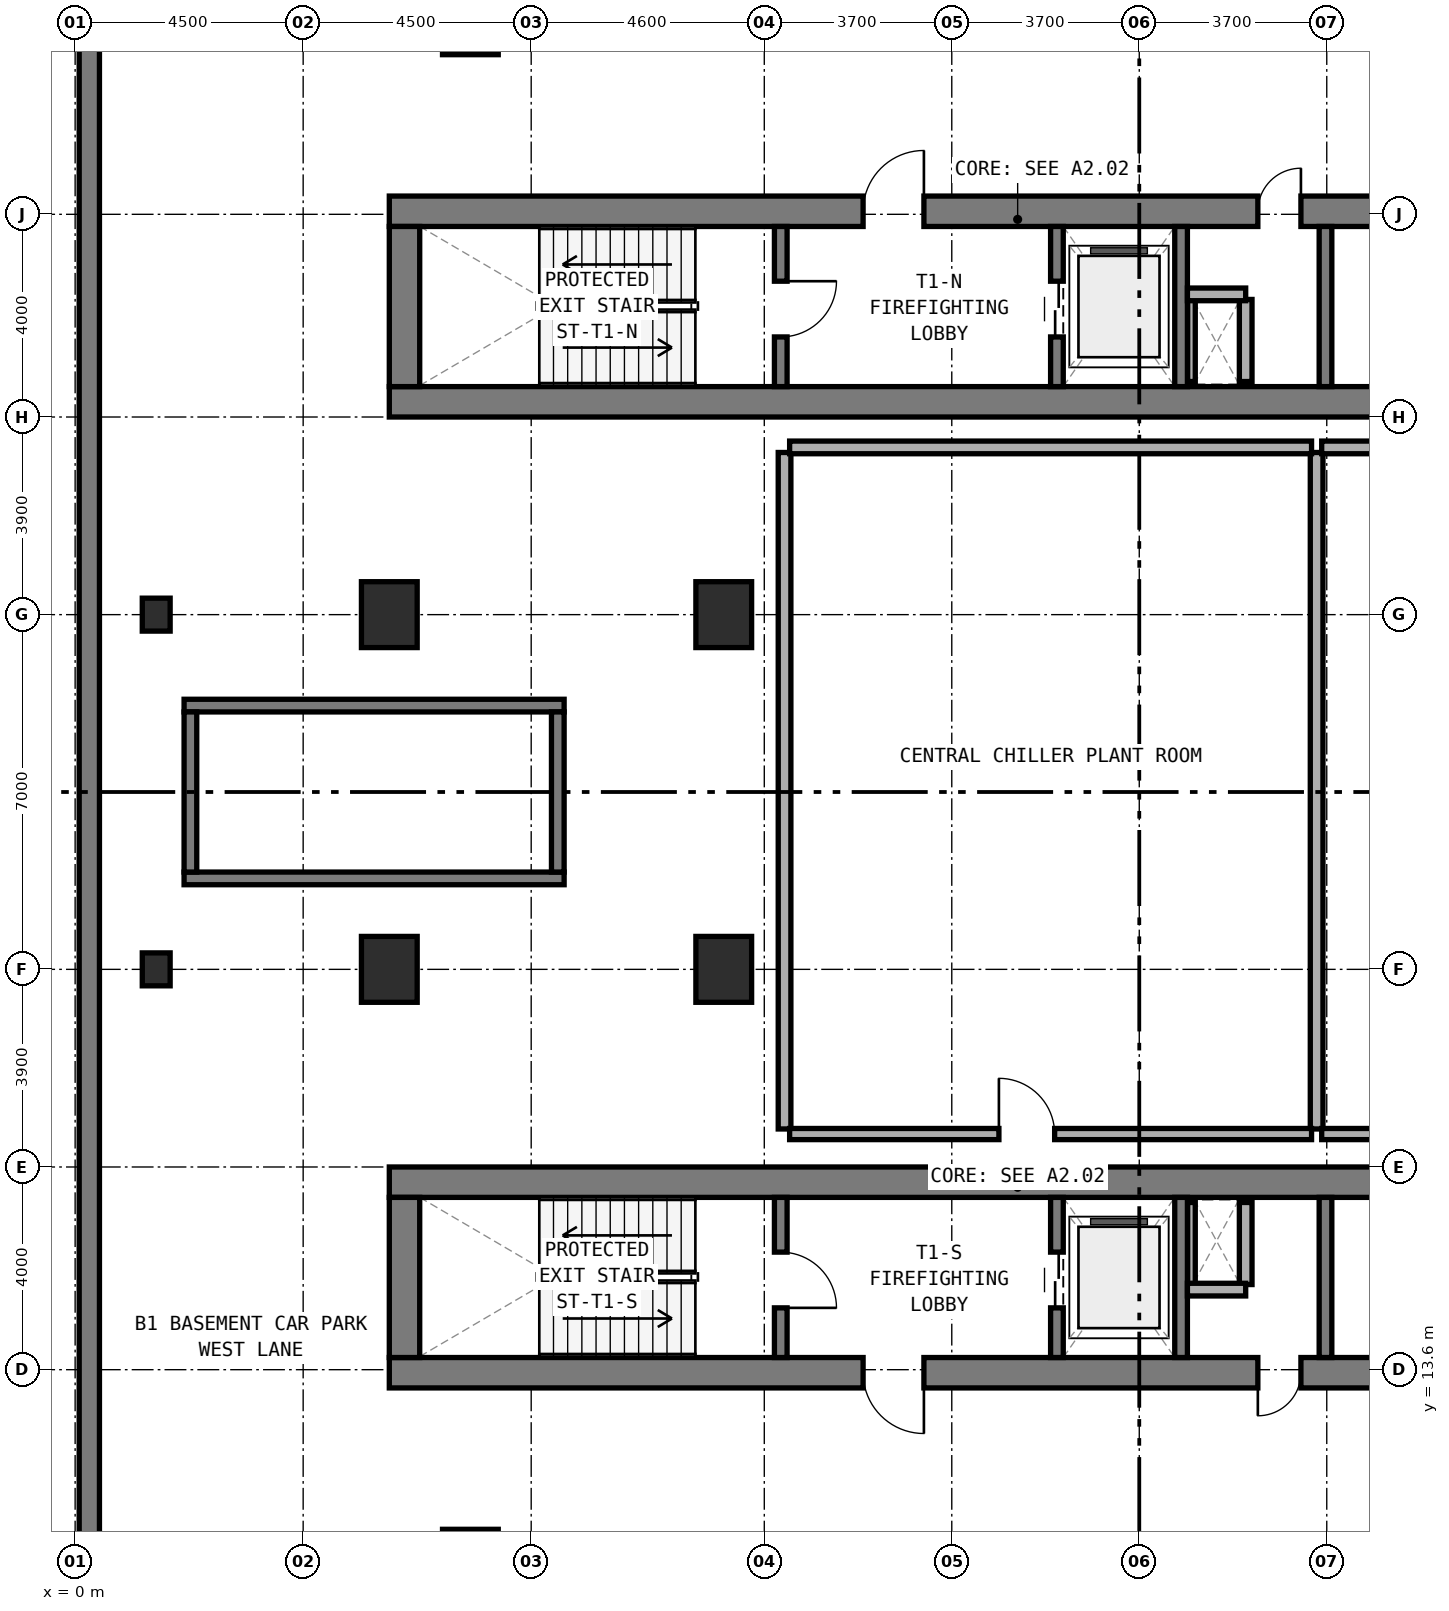
"""IFC4 building model, lengths in metres.
Left out: names, types, materials, properties, quantities, classifications, styles, units other than length and angle.
Written with IfcOpenShell. Run it as: python <this file> out.ifc"""

import sys

from ifc_helpers import new_model, si_unit, direction, frame, frame_2d, origin, origin_2d, place, context, subcontext, project, spatial, rectangle, extrude, element, fill, save


model = new_model("IFC4")
c1 = context("Model", 3, precision=1e-05, world=origin(), true_north=direction((0.0, 1.0)))
c2 = subcontext(c1, "Body", "Model", "MODEL_VIEW")
j1 = project(units=[si_unit("LENGTHUNIT", "METRE"), si_unit("PLANEANGLEUNIT", "RADIAN")], contexts=[c1])
p1 = place(None, origin())
s1 = spatial("IfcSite", under=j1, at=p1, CompositionType="ELEMENT")
p2 = place(p1, origin())
s2 = spatial("IfcBuilding", under=s1, at=p2, CompositionType="ELEMENT")
p3 = place(p2, frame((0.0, 0.0, -4.2)))
s3 = spatial("IfcBuildingStorey", under=s2, at=p3, CompositionType="ELEMENT", Elevation=-4.2)
p4 = place(p3, frame((0.28, 49.52, 0.0), z_axis=(0.0, 0.0, 1.0), x_axis=(0.0, -1.0, 0.0)))
e1 = element("IfcWall", 1, at=p4, inside=s3, PredefinedType="USERDEFINED", context=c2, shape_type="SweptSolid", body=[
    extrude(rectangle(XDim=49.04, YDim=0.4, at=frame_2d((24.52, 0.0))), origin(), (0.0, 0.0, 1.0), 4.2),
])
p5 = place(p3, frame((6.2, 32.7, 0.0), z_axis=(0.0, 0.0, 1.0), x_axis=(1.0, 0.0, 0.0)))
e2 = element("IfcWall", 2, at=p5, inside=s3, PredefinedType="SHEAR", context=c2, shape_type="SweptSolid", body=[
    extrude(rectangle(XDim=24.8, YDim=0.6, at=frame_2d((12.4, 0.0))), origin(), (0.0, 0.0, 1.0), 4.2),
])
p6 = place(p3, frame((6.2, 36.46, 0.0), z_axis=(0.0, 0.0, 1.0), x_axis=(1.0, 0.0, 0.0)))
e3 = element("IfcWall", 3, at=p6, inside=s3, PredefinedType="SHEAR", context=c2, shape_type="SweptSolid", body=[
    extrude(rectangle(XDim=24.8, YDim=0.6, at=frame_2d((12.4, 0.0))), origin(), (0.0, 0.0, 1.0), 4.2),
])
p7 = place(p6, frame((9.35, 0.0, 0.0)))
e4 = element("IfcOpeningElement", 4, at=p7, cuts=e3, PredefinedType="OPENING", context=c2, shape_type="SweptSolid", body=[
    extrude(rectangle(XDim=1.2, YDim=2.15, at=frame_2d((0.6, 1.075))), frame((0.0, 0.31, 0.0), z_axis=(0.0, -1.0, 0.0), x_axis=(1.0, 0.0, 0.0)), (0.0, 0.0, 1.0), 0.62),
])
p8 = place(p6, frame((17.14, 0.0, 0.0)))
e5 = element("IfcOpeningElement", 5, at=p8, cuts=e3, PredefinedType="OPENING", context=c2, shape_type="SweptSolid", body=[
    extrude(rectangle(XDim=0.85, YDim=2.1, at=frame_2d((0.425, 1.05))), frame((0.0, 0.31, 0.0), z_axis=(0.0, -1.0, 0.0), x_axis=(1.0, 0.0, 0.0)), (0.0, 0.0, 1.0), 0.62),
])
p9 = place(p3, frame((6.5, 33.0, 0.0), z_axis=(0.0, 0.0, 1.0), x_axis=(0.0, 1.0, 0.0)))
e6 = element("IfcWall", 6, at=p9, inside=s3, PredefinedType="SHEAR", context=c2, shape_type="SweptSolid", body=[
    extrude(rectangle(XDim=3.16, YDim=0.6, at=frame_2d((1.58, 0.0))), origin(), (0.0, 0.0, 1.0), 4.2),
])
p10 = place(p3, frame((13.925, 33.0, 0.0), z_axis=(0.0, 0.0, 1.0), x_axis=(0.0, 1.0, 0.0)))
e7 = element("IfcWall", 7, at=p10, inside=s3, PredefinedType="STANDARD", context=c2, shape_type="SweptSolid", body=[
    extrude(rectangle(XDim=3.16, YDim=0.25, at=frame_2d((1.58, 0.0))), origin(), (0.0, 0.0, 1.0), 3.85),
])
p11 = place(p10, frame((0.98, 0.0, 0.0)))
e8 = element("IfcOpeningElement", 8, at=p11, cuts=e7, PredefinedType="OPENING", context=c2, shape_type="SweptSolid", body=[
    extrude(rectangle(XDim=1.1, YDim=2.15, at=frame_2d((0.55, 1.075))), frame((0.0, 0.135, 0.0), z_axis=(0.0, -1.0, 0.0), x_axis=(1.0, 0.0, 0.0)), (0.0, 0.0, 1.0), 0.27),
])
p12 = place(p3, frame((19.375, 33.0, 0.0), z_axis=(0.0, 0.0, 1.0), x_axis=(0.0, 1.0, 0.0)))
e9 = element("IfcWall", 9, at=p12, inside=s3, PredefinedType="STANDARD", context=c2, shape_type="SweptSolid", body=[
    extrude(rectangle(XDim=3.16, YDim=0.25, at=frame_2d((1.58, 0.0))), origin(), (0.0, 0.0, 1.0), 3.85),
])
p13 = place(p12, frame((0.98, 0.0, 0.0)))
e10 = element("IfcOpeningElement", 10, at=p13, cuts=e9, PredefinedType="OPENING", context=c2, shape_type="SweptSolid", body=[
    extrude(rectangle(XDim=1.1, YDim=2.15, at=frame_2d((0.55, 1.075))), frame((0.0, 0.135, 0.0), z_axis=(0.0, -1.0, 0.0), x_axis=(1.0, 0.0, 0.0)), (0.0, 0.0, 1.0), 0.27),
])
for number, where, z_axis, x_axis in (
    (11, (21.825, 33.0, 0.0), (0.0, 0.0, 1.0), (0.0, 1.0, 0.0)),
    (12, (24.675, 33.0, 0.0), (0.0, 0.0, 1.0), (0.0, 1.0, 0.0)),
):
    element("IfcWall", number, at=place(p3, frame(where, z_axis=z_axis, x_axis=x_axis)), inside=s3, PredefinedType="STANDARD", context=c2, shape_type="SweptSolid", body=[
        extrude(rectangle(XDim=3.16, YDim=0.25, at=frame_2d((1.58, 0.0))), origin(), (0.0, 0.0, 1.0), 3.85),
    ])
p14 = place(p3, frame((6.2, 13.54, 0.0), z_axis=(0.0, 0.0, 1.0), x_axis=(1.0, 0.0, 0.0)))
e13 = element("IfcWall", 13, at=p14, inside=s3, PredefinedType="SHEAR", context=c2, shape_type="SweptSolid", body=[
    extrude(rectangle(XDim=24.8, YDim=0.6, at=frame_2d((12.4, 0.0))), origin(), (0.0, 0.0, 1.0), 4.2),
])
p15 = place(p14, frame((9.35, 0.0, 0.0)))
e14 = element("IfcOpeningElement", 14, at=p15, cuts=e13, PredefinedType="OPENING", context=c2, shape_type="SweptSolid", body=[
    extrude(rectangle(XDim=1.2, YDim=2.15, at=frame_2d((0.6, 1.075))), frame((0.0, 0.31, 0.0), z_axis=(0.0, -1.0, 0.0), x_axis=(1.0, 0.0, 0.0)), (0.0, 0.0, 1.0), 0.62),
])
p16 = place(p14, frame((17.14, 0.0, 0.0)))
e15 = element("IfcOpeningElement", 15, at=p16, cuts=e13, PredefinedType="OPENING", context=c2, shape_type="SweptSolid", body=[
    extrude(rectangle(XDim=0.85, YDim=2.1, at=frame_2d((0.425, 1.05))), frame((0.0, 0.31, 0.0), z_axis=(0.0, -1.0, 0.0), x_axis=(1.0, 0.0, 0.0)), (0.0, 0.0, 1.0), 0.62),
])
p17 = place(p3, frame((6.2, 17.3, 0.0), z_axis=(0.0, 0.0, 1.0), x_axis=(1.0, 0.0, 0.0)))
e16 = element("IfcWall", 16, at=p17, inside=s3, PredefinedType="SHEAR", context=c2, shape_type="SweptSolid", body=[
    extrude(rectangle(XDim=24.8, YDim=0.6, at=frame_2d((12.4, 0.0))), origin(), (0.0, 0.0, 1.0), 4.2),
])
p18 = place(p3, frame((6.5, 13.84, 0.0), z_axis=(0.0, 0.0, 1.0), x_axis=(0.0, 1.0, 0.0)))
e17 = element("IfcWall", 17, at=p18, inside=s3, PredefinedType="SHEAR", context=c2, shape_type="SweptSolid", body=[
    extrude(rectangle(XDim=3.16, YDim=0.6, at=frame_2d((1.58, 0.0))), origin(), (0.0, 0.0, 1.0), 4.2),
])
p19 = place(p3, frame((13.925, 13.84, 0.0), z_axis=(0.0, 0.0, 1.0), x_axis=(0.0, 1.0, 0.0)))
e18 = element("IfcWall", 18, at=p19, inside=s3, PredefinedType="STANDARD", context=c2, shape_type="SweptSolid", body=[
    extrude(rectangle(XDim=3.16, YDim=0.25, at=frame_2d((1.58, 0.0))), origin(), (0.0, 0.0, 1.0), 3.85),
])
p20 = place(p19, frame((0.98, 0.0, 0.0)))
e19 = element("IfcOpeningElement", 19, at=p20, cuts=e18, PredefinedType="OPENING", context=c2, shape_type="SweptSolid", body=[
    extrude(rectangle(XDim=1.1, YDim=2.15, at=frame_2d((0.55, 1.075))), frame((0.0, 0.135, 0.0), z_axis=(0.0, -1.0, 0.0), x_axis=(1.0, 0.0, 0.0)), (0.0, 0.0, 1.0), 0.27),
])
p21 = place(p3, frame((19.375, 13.84, 0.0), z_axis=(0.0, 0.0, 1.0), x_axis=(0.0, 1.0, 0.0)))
e20 = element("IfcWall", 20, at=p21, inside=s3, PredefinedType="STANDARD", context=c2, shape_type="SweptSolid", body=[
    extrude(rectangle(XDim=3.16, YDim=0.25, at=frame_2d((1.58, 0.0))), origin(), (0.0, 0.0, 1.0), 3.85),
])
p22 = place(p21, frame((0.98, 0.0, 0.0)))
e21 = element("IfcOpeningElement", 21, at=p22, cuts=e20, PredefinedType="OPENING", context=c2, shape_type="SweptSolid", body=[
    extrude(rectangle(XDim=1.1, YDim=2.15, at=frame_2d((0.55, 1.075))), frame((0.0, 0.135, 0.0), z_axis=(0.0, -1.0, 0.0), x_axis=(1.0, 0.0, 0.0)), (0.0, 0.0, 1.0), 0.27),
])
for number, where, z_axis, x_axis in (
    (22, (21.825, 13.84, 0.0), (0.0, 0.0, 1.0), (0.0, 1.0, 0.0)),
    (23, (24.675, 13.84, 0.0), (0.0, 0.0, 1.0), (0.0, 1.0, 0.0)),
):
    element("IfcWall", number, at=place(p3, frame(where, z_axis=z_axis, x_axis=x_axis)), inside=s3, PredefinedType="STANDARD", context=c2, shape_type="SweptSolid", body=[
        extrude(rectangle(XDim=3.16, YDim=0.25, at=frame_2d((1.58, 0.0))), origin(), (0.0, 0.0, 1.0), 3.85),
    ])
for number, where, z_axis, x_axis in (
    (24, (2.15, 23.295, 0.0), (0.0, 0.0, 1.0), (1.0, 0.0, 0.0)),
    (25, (2.15, 26.705, 0.0), (0.0, 0.0, 1.0), (1.0, 0.0, 0.0)),
):
    element("IfcWall", number, at=place(p3, frame(where, z_axis=z_axis, x_axis=x_axis)), inside=s3, PredefinedType="STANDARD", context=c2, shape_type="SweptSolid", body=[
        extrude(rectangle(XDim=7.5, YDim=0.25, at=frame_2d((3.75, 0.0))), origin(), (0.0, 0.0, 1.0), 4.2),
    ])
for number, where, z_axis, x_axis in (
    (26, (2.275, 23.42, 0.0), (0.0, 0.0, 1.0), (0.0, 1.0, 0.0)),
    (27, (9.525, 23.42, 0.0), (0.0, 0.0, 1.0), (0.0, 1.0, 0.0)),
):
    element("IfcWall", number, at=place(p3, frame(where, z_axis=z_axis, x_axis=x_axis)), inside=s3, PredefinedType="STANDARD", context=c2, shape_type="SweptSolid", body=[
        extrude(rectangle(XDim=3.16, YDim=0.25, at=frame_2d((1.58, 0.0))), origin(), (0.0, 0.0, 1.0), 4.2),
    ])
for number, where, z_axis, x_axis in (
    (28, (6.2, 21.5, 0.0), (0.0, 0.0, 1.0), (1.0, 0.0, 0.0)),
    (29, (6.2, 28.5, 0.0), (0.0, 0.0, 1.0), (1.0, 0.0, 0.0)),
    (30, (7.8, 9.8, 0.0), (0.0, 0.0, 1.0), (1.0, 0.0, 0.0)),
    (31, (7.8, 40.2, 0.0), (0.0, 0.0, 1.0), (1.0, 0.0, 0.0)),
    (32, (12.8, 21.5, 0.0), (0.0, 0.0, 1.0), (1.0, 0.0, 0.0)),
    (33, (12.8, 28.5, 0.0), (0.0, 0.0, 1.0), (1.0, 0.0, 0.0)),
):
    element("IfcColumn", number, at=place(p3, frame(where, z_axis=z_axis, x_axis=x_axis)), inside=s3, PredefinedType="COLUMN", context=c2, shape_type="SweptSolid", body=[
        extrude(rectangle(XDim=1.1, YDim=1.3, at=origin_2d()), origin(), (0.0, 0.0, 1.0), 4.2),
    ])
for number, where, z_axis, x_axis in (
    (34, (1.6, 21.5, 0.0), (0.0, 0.0, 1.0), (1.0, 0.0, 0.0)),
    (35, (1.6, 28.5, 0.0), (0.0, 0.0, 1.0), (1.0, 0.0, 0.0)),
):
    element("IfcColumn", number, at=place(p3, frame(where, z_axis=z_axis, x_axis=x_axis)), inside=s3, PredefinedType="PILASTER", context=c2, shape_type="SweptSolid", body=[
        extrude(rectangle(XDim=0.55, YDim=0.65, at=origin_2d()), origin(), (0.0, 0.0, 1.0), 4.2),
    ])
p23 = place(p3, frame((22.03, 33.1, 0.0), z_axis=(0.0, 0.0, 1.0), x_axis=(0.0, 1.0, 0.0)))
e36 = element("IfcWall", 36, at=p23, inside=s3, PredefinedType="PARTITIONING", context=c2, shape_type="SweptSolid", body=[
    extrude(rectangle(XDim=1.62, YDim=0.15, at=frame_2d((0.81, 0.0))), origin(), (0.0, 0.0, 1.0), 3.85),
])
p24 = place(p3, frame((23.1, 33.1, 0.0), z_axis=(0.0, 0.0, 1.0), x_axis=(0.0, 1.0, 0.0)))
e37 = element("IfcWall", 37, at=p24, inside=s3, PredefinedType="SOLIDWALL", context=c2, shape_type="SweptSolid", body=[
    extrude(rectangle(XDim=1.62, YDim=0.25, at=frame_2d((0.81, 0.0))), origin(), (0.0, 0.0, 1.0), 3.85),
])
p25 = place(p3, frame((21.95, 34.82, 0.0), z_axis=(0.0, 0.0, 1.0), x_axis=(1.0, 0.0, 0.0)))
e38 = element("IfcWall", 38, at=p25, inside=s3, PredefinedType="SOLIDWALL", context=c2, shape_type="SweptSolid", body=[
    extrude(rectangle(XDim=1.15, YDim=0.25, at=frame_2d((0.575, 0.0))), origin(), (0.0, 0.0, 1.0), 3.85),
])
p26 = place(p3, frame((22.03, 15.28, 0.0), z_axis=(0.0, 0.0, 1.0), x_axis=(0.0, 1.0, 0.0)))
e39 = element("IfcWall", 39, at=p26, inside=s3, PredefinedType="PARTITIONING", context=c2, shape_type="SweptSolid", body=[
    extrude(rectangle(XDim=1.62, YDim=0.15, at=frame_2d((0.81, 0.0))), origin(), (0.0, 0.0, 1.0), 3.85),
])
p27 = place(p3, frame((23.1, 15.28, 0.0), z_axis=(0.0, 0.0, 1.0), x_axis=(0.0, 1.0, 0.0)))
e40 = element("IfcWall", 40, at=p27, inside=s3, PredefinedType="SOLIDWALL", context=c2, shape_type="SweptSolid", body=[
    extrude(rectangle(XDim=1.62, YDim=0.25, at=frame_2d((0.81, 0.0))), origin(), (0.0, 0.0, 1.0), 3.85),
])
p28 = place(p3, frame((21.95, 15.18, 0.0), z_axis=(0.0, 0.0, 1.0), x_axis=(1.0, 0.0, 0.0)))
e41 = element("IfcWall", 41, at=p28, inside=s3, PredefinedType="SOLIDWALL", context=c2, shape_type="SweptSolid", body=[
    extrude(rectangle(XDim=1.15, YDim=0.25, at=frame_2d((0.575, 0.0))), origin(), (0.0, 0.0, 1.0), 3.85),
])
for number, where, z_axis, x_axis in (
    (42, (14.0, 18.35, 0.0), (0.0, 0.0, 1.0), (0.0, 1.0, 0.0)),
    (43, (24.5, 18.35, 0.0), (0.0, 0.0, 1.0), (0.0, 1.0, 0.0)),
):
    element("IfcWall", number, at=place(p3, frame(where, z_axis=z_axis, x_axis=x_axis)), inside=s3, PredefinedType="SOLIDWALL", context=c2, shape_type="SweptSolid", body=[
        extrude(rectangle(XDim=13.35, YDim=0.25, at=frame_2d((6.675, 0.0))), origin(), (0.0, 0.0, 1.0), 3.85),
    ])
p29 = place(p3, frame((14.1, 31.8, 0.0), z_axis=(0.0, 0.0, 1.0), x_axis=(1.0, 0.0, 0.0)))
e44 = element("IfcWall", 44, at=p29, inside=s3, PredefinedType="SOLIDWALL", context=c2, shape_type="SweptSolid", body=[
    extrude(rectangle(XDim=10.3, YDim=0.25, at=frame_2d((5.15, 0.0))), origin(), (0.0, 0.0, 1.0), 3.85),
])
p30 = place(p3, frame((14.1, 18.25, 0.0), z_axis=(0.0, 0.0, 1.0), x_axis=(1.0, 0.0, 0.0)))
e45 = element("IfcWall", 45, at=p30, inside=s3, PredefinedType="SOLIDWALL", context=c2, shape_type="SweptSolid", body=[
    extrude(rectangle(XDim=10.3, YDim=0.22, at=frame_2d((5.15, 0.0))), origin(), (0.0, 0.0, 1.0), 3.85),
])
p31 = place(p30, frame((4.13, 0.0, 0.0)))
e46 = element("IfcOpeningElement", 46, at=p31, cuts=e45, PredefinedType="OPENING", context=c2, shape_type="SweptSolid", body=[
    extrude(rectangle(XDim=1.1, YDim=2.1, at=frame_2d((0.55, 1.05))), frame((0.0, 0.12, 0.0), z_axis=(0.0, -1.0, 0.0), x_axis=(1.0, 0.0, 0.0)), (0.0, 0.0, 1.0), 0.24),
])
p32 = place(p3, frame((24.6, 31.8, 0.0), z_axis=(0.0, 0.0, 1.0), x_axis=(1.0, 0.0, 0.0)))
e47 = element("IfcWall", 47, at=p32, inside=s3, PredefinedType="SOLIDWALL", context=c2, shape_type="SweptSolid", body=[
    extrude(rectangle(XDim=8.4, YDim=0.25, at=frame_2d((4.2, 0.0))), origin(), (0.0, 0.0, 1.0), 3.125),
])
p33 = place(p3, frame((24.6, 18.25, 0.0), z_axis=(0.0, 0.0, 1.0), x_axis=(1.0, 0.0, 0.0)))
e48 = element("IfcWall", 48, at=p33, inside=s3, PredefinedType="SOLIDWALL", context=c2, shape_type="SweptSolid", body=[
    extrude(rectangle(XDim=8.4, YDim=0.22, at=frame_2d((4.2, 0.0))), origin(), (0.0, 0.0, 1.0), 3.125),
])
p34 = place(p33, frame((6.675, 0.0, 0.0)))
e49 = element("IfcOpeningElement", 49, at=p34, cuts=e48, PredefinedType="OPENING", context=c2, shape_type="SweptSolid", body=[
    extrude(rectangle(XDim=1.1, YDim=2.1, at=frame_2d((0.55, 1.05))), frame((0.0, 0.12, 0.0), z_axis=(0.0, -1.0, 0.0), x_axis=(1.0, 0.0, 0.0)), (0.0, 0.0, 1.0), 0.24),
])
p35 = place(p11, frame((1.1, 0.0, 0.0), z_axis=(0.0, 0.0, 1.0), x_axis=(-1.0, 0.0, 0.0)))
e50 = element("IfcDoor", 50, at=p35, inside=s3, OperationType="SINGLE_SWING_LEFT", PredefinedType="DOOR", context=c2, shape_type="SweptSolid", body=[
    extrude(rectangle(XDim=1.1, YDim=2.15, at=frame_2d((0.55, 1.075))), frame((0.0, 0.025, 0.0), z_axis=(0.0, -1.0, 0.0), x_axis=(1.0, 0.0, 0.0)), (0.0, 0.0, 1.0), 0.05),
])
fill(e8, e50)
p36 = place(p7, origin())
e51 = element("IfcDoor", 51, at=p36, inside=s3, OperationType="SINGLE_SWING_RIGHT", PredefinedType="DOOR", context=c2, shape_type="SweptSolid", body=[
    extrude(rectangle(XDim=1.2, YDim=2.15, at=frame_2d((0.6, 1.075))), frame((0.0, 0.025, 0.0), z_axis=(0.0, -1.0, 0.0), x_axis=(1.0, 0.0, 0.0)), (0.0, 0.0, 1.0), 0.05),
])
fill(e4, e51)
p37 = place(p13, origin())
e52 = element("IfcDoor", 52, at=p37, inside=s3, OperationType="DOUBLE_DOOR_SLIDING", PredefinedType="DOOR", context=c2, shape_type="SweptSolid", body=[
    extrude(rectangle(XDim=1.1, YDim=2.15, at=frame_2d((0.55, 1.075))), frame((0.0, 0.025, 0.0), z_axis=(0.0, -1.0, 0.0), x_axis=(1.0, 0.0, 0.0)), (0.0, 0.0, 1.0), 0.05),
])
fill(e10, e52)
p38 = place(p8, origin())
e53 = element("IfcDoor", 53, at=p38, inside=s3, OperationType="SINGLE_SWING_RIGHT", PredefinedType="DOOR", context=c2, shape_type="SweptSolid", body=[
    extrude(rectangle(XDim=0.85, YDim=2.1, at=frame_2d((0.425, 1.05))), frame((0.0, 0.025, 0.0), z_axis=(0.0, -1.0, 0.0), x_axis=(1.0, 0.0, 0.0)), (0.0, 0.0, 1.0), 0.05),
])
fill(e5, e53)
p39 = place(p20, frame((1.1, 0.0, 0.0), z_axis=(0.0, 0.0, 1.0), x_axis=(-1.0, 0.0, 0.0)))
e54 = element("IfcDoor", 54, at=p39, inside=s3, OperationType="SINGLE_SWING_RIGHT", PredefinedType="DOOR", context=c2, shape_type="SweptSolid", body=[
    extrude(rectangle(XDim=1.1, YDim=2.15, at=frame_2d((0.55, 1.075))), frame((0.0, 0.025, 0.0), z_axis=(0.0, -1.0, 0.0), x_axis=(1.0, 0.0, 0.0)), (0.0, 0.0, 1.0), 0.05),
])
fill(e19, e54)
p40 = place(p15, frame((1.2, 0.0, 0.0), z_axis=(0.0, 0.0, 1.0), x_axis=(-1.0, 0.0, 0.0)))
e55 = element("IfcDoor", 55, at=p40, inside=s3, OperationType="SINGLE_SWING_LEFT", PredefinedType="DOOR", context=c2, shape_type="SweptSolid", body=[
    extrude(rectangle(XDim=1.2, YDim=2.15, at=frame_2d((0.6, 1.075))), frame((0.0, 0.025, 0.0), z_axis=(0.0, -1.0, 0.0), x_axis=(1.0, 0.0, 0.0)), (0.0, 0.0, 1.0), 0.05),
])
fill(e14, e55)
p41 = place(p22, origin())
e56 = element("IfcDoor", 56, at=p41, inside=s3, OperationType="DOUBLE_DOOR_SLIDING", PredefinedType="DOOR", context=c2, shape_type="SweptSolid", body=[
    extrude(rectangle(XDim=1.1, YDim=2.15, at=frame_2d((0.55, 1.075))), frame((0.0, 0.025, 0.0), z_axis=(0.0, -1.0, 0.0), x_axis=(1.0, 0.0, 0.0)), (0.0, 0.0, 1.0), 0.05),
])
fill(e21, e56)
p42 = place(p16, frame((0.85, 0.0, 0.0), z_axis=(0.0, 0.0, 1.0), x_axis=(-1.0, 0.0, 0.0)))
e57 = element("IfcDoor", 57, at=p42, inside=s3, OperationType="SINGLE_SWING_RIGHT", PredefinedType="DOOR", context=c2, shape_type="SweptSolid", body=[
    extrude(rectangle(XDim=0.85, YDim=2.1, at=frame_2d((0.425, 1.05))), frame((0.0, 0.025, 0.0), z_axis=(0.0, -1.0, 0.0), x_axis=(1.0, 0.0, 0.0)), (0.0, 0.0, 1.0), 0.05),
])
fill(e15, e57)
p43 = place(p31, origin())
e58 = element("IfcDoor", 58, at=p43, inside=s3, OperationType="SINGLE_SWING_LEFT", PredefinedType="DOOR", context=c2, shape_type="SweptSolid", body=[
    extrude(rectangle(XDim=1.1, YDim=2.1, at=frame_2d((0.55, 1.05))), frame((0.0, 0.025, 0.0), z_axis=(0.0, -1.0, 0.0), x_axis=(1.0, 0.0, 0.0)), (0.0, 0.0, 1.0), 0.05),
])
fill(e46, e58)
save(model, sys.argv[1])
